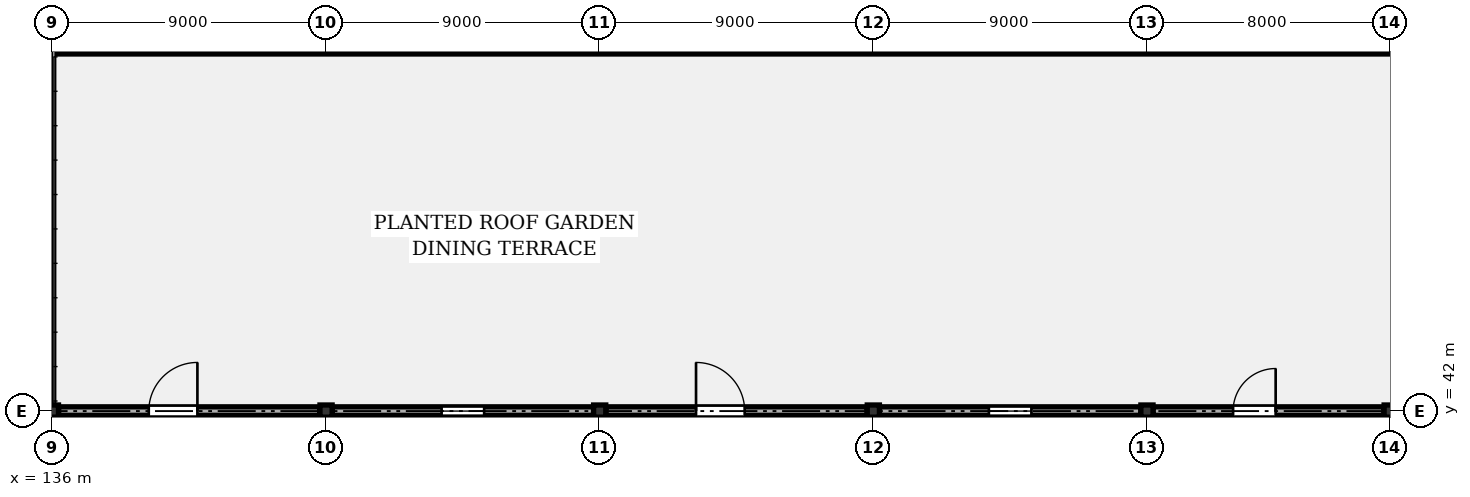
"""IFC4 building model, lengths in metres.
Left out: names, types, materials, properties, quantities, classifications, styles, units other than length and angle.
Written with IfcOpenShell. Run it as: python <this file> out.ifc"""

import sys

from ifc_helpers import new_model, si_unit, direction, frame, frame_2d, origin, origin_2d, place, context, subcontext, project, spatial, rectangle, i_section, extrude, element, fill, save


model = new_model("IFC4")
c1 = context("Model", 3, precision=1e-05, world=origin(), true_north=direction((0.0, 1.0)))
c2 = subcontext(c1, "Body", "Model", "MODEL_VIEW")
j1 = project(units=[si_unit("LENGTHUNIT", "METRE"), si_unit("PLANEANGLEUNIT", "RADIAN")], contexts=[c1])
p1 = place(None, origin())
s1 = spatial("IfcSite", under=j1, at=p1, CompositionType="ELEMENT")
p2 = place(p1, origin())
s2 = spatial("IfcBuilding", under=s1, at=p2, CompositionType="ELEMENT")
p3 = place(p2, frame((0.0, 0.0, 10.8)))
s3 = spatial("IfcBuildingStorey", under=s2, at=p3, CompositionType="ELEMENT", Elevation=10.8)
for number, where, z_axis, x_axis in (
    (1, (136.0, 42.0, 0.0), (0.0, 0.0, 1.0), (1.0, 0.0, 0.0)),
    (2, (145.0, 42.0, 0.0), (0.0, 0.0, 1.0), (1.0, 0.0, 0.0)),
    (3, (154.0, 42.0, 0.0), (0.0, 0.0, 1.0), (1.0, 0.0, 0.0)),
    (4, (163.0, 42.0, 0.0), (0.0, 0.0, 1.0), (1.0, 0.0, 0.0)),
    (5, (172.0, 42.0, 0.0), (0.0, 0.0, 1.0), (1.0, 0.0, 0.0)),
    (6, (180.0, 42.0, 0.0), (0.0, 0.0, 1.0), (1.0, 0.0, 0.0)),
):
    element("IfcColumn", number, at=place(p3, frame(where, z_axis=z_axis, x_axis=x_axis)), inside=s3, PredefinedType="COLUMN", context=c2, shape_type="SweptSolid", body=[
        extrude(i_section(OverallWidth=0.4, OverallDepth=0.4, WebThickness=0.013, FlangeThickness=0.021, FilletRadius=0.022, at=origin_2d()), origin(), (0.0, 0.0, 1.0), 3.6),
    ])
p4 = place(p3, frame((136.2, 42.0, 0.0), z_axis=(0.0, 0.0, 1.0), x_axis=(1.0, 0.0, 0.0)))
e7 = element("IfcWall", 7, at=p4, inside=s3, PredefinedType="SOLIDWALL", context=c2, shape_type="SweptSolid", body=[
    extrude(rectangle(XDim=8.6, YDim=0.28, at=frame_2d((4.3, 0.0))), origin(), (0.0, 0.0, 1.0), 2.795),
])
p5 = place(p4, frame((2.969, 0.0, 0.0)))
e8 = element("IfcOpeningElement", 8, at=p5, cuts=e7, PredefinedType="OPENING", context=c2, shape_type="SweptSolid", body=[
    extrude(rectangle(XDim=1.6, YDim=2.3, at=frame_2d((0.8, 1.15))), frame((0.0, 0.15, 0.0), z_axis=(0.0, -1.0, 0.0), x_axis=(1.0, 0.0, 0.0)), (0.0, 0.0, 1.0), 0.3),
])
p6 = place(p3, frame((145.2, 42.0, 0.0), z_axis=(0.0, 0.0, 1.0), x_axis=(1.0, 0.0, 0.0)))
e9 = element("IfcWall", 9, at=p6, inside=s3, PredefinedType="SOLIDWALL", context=c2, shape_type="SweptSolid", body=[
    extrude(rectangle(XDim=8.6, YDim=0.28, at=frame_2d((4.3, 0.0))), origin(), (0.0, 0.0, 1.0), 2.795),
])
p7 = place(p6, frame((3.6, 0.0, 0.75)))
e10 = element("IfcOpeningElement", 10, at=p7, cuts=e9, PredefinedType="OPENING", context=c2, shape_type="SweptSolid", body=[
    extrude(rectangle(XDim=1.4, YDim=1.55, at=frame_2d((0.7, 0.775))), frame((0.0, 0.15, 0.0), z_axis=(0.0, -1.0, 0.0), x_axis=(1.0, 0.0, 0.0)), (0.0, 0.0, 1.0), 0.3),
])
p8 = place(p3, frame((154.2, 42.0, 0.0), z_axis=(0.0, 0.0, 1.0), x_axis=(1.0, 0.0, 0.0)))
e11 = element("IfcWall", 11, at=p8, inside=s3, PredefinedType="SOLIDWALL", context=c2, shape_type="SweptSolid", body=[
    extrude(rectangle(XDim=8.6, YDim=0.28, at=frame_2d((4.3, 0.0))), origin(), (0.0, 0.0, 1.0), 2.795),
])
p9 = place(p8, frame((2.969, 0.0, 0.0)))
e12 = element("IfcOpeningElement", 12, at=p9, cuts=e11, PredefinedType="OPENING", context=c2, shape_type="SweptSolid", body=[
    extrude(rectangle(XDim=1.6, YDim=2.3, at=frame_2d((0.8, 1.15))), frame((0.0, 0.15, 0.0), z_axis=(0.0, -1.0, 0.0), x_axis=(1.0, 0.0, 0.0)), (0.0, 0.0, 1.0), 0.3),
])
p10 = place(p3, frame((163.2, 42.0, 0.0), z_axis=(0.0, 0.0, 1.0), x_axis=(1.0, 0.0, 0.0)))
e13 = element("IfcWall", 13, at=p10, inside=s3, PredefinedType="SOLIDWALL", context=c2, shape_type="SweptSolid", body=[
    extrude(rectangle(XDim=8.6, YDim=0.28, at=frame_2d((4.3, 0.0))), origin(), (0.0, 0.0, 1.0), 2.795),
])
p11 = place(p10, frame((3.6, 0.0, 0.75)))
e14 = element("IfcOpeningElement", 14, at=p11, cuts=e13, PredefinedType="OPENING", context=c2, shape_type="SweptSolid", body=[
    extrude(rectangle(XDim=1.4, YDim=1.55, at=frame_2d((0.7, 0.775))), frame((0.0, 0.15, 0.0), z_axis=(0.0, -1.0, 0.0), x_axis=(1.0, 0.0, 0.0)), (0.0, 0.0, 1.0), 0.3),
])
p12 = place(p3, frame((172.2, 42.0, 0.0), z_axis=(0.0, 0.0, 1.0), x_axis=(1.0, 0.0, 0.0)))
e15 = element("IfcWall", 15, at=p12, inside=s3, PredefinedType="SOLIDWALL", context=c2, shape_type="SweptSolid", body=[
    extrude(rectangle(XDim=7.6, YDim=0.28, at=frame_2d((3.8, 0.0))), origin(), (0.0, 0.0, 1.0), 2.795),
])
p13 = place(p12, frame((2.633, 0.0, 0.0)))
e16 = element("IfcOpeningElement", 16, at=p13, cuts=e15, PredefinedType="OPENING", context=c2, shape_type="SweptSolid", body=[
    extrude(rectangle(XDim=1.4, YDim=2.25, at=frame_2d((0.7, 1.125))), frame((0.0, 0.15, 0.0), z_axis=(0.0, -1.0, 0.0), x_axis=(1.0, 0.0, 0.0)), (0.0, 0.0, 1.0), 0.3),
])
p14 = place(p3, frame((136.15, 53.85, 0.0), z_axis=(0.0, 0.0, 1.0), x_axis=(1.0, 0.0, 0.0)))
e17 = element("IfcWall", 17, at=p14, inside=s3, PredefinedType="PARAPET", context=c2, shape_type="SweptSolid", body=[
    extrude(rectangle(XDim=51.7, YDim=0.21, at=frame_2d((25.85, 0.0))), origin(), (0.0, 0.0, 1.0), 1.25),
])
p15 = place(p5, origin())
e18 = element("IfcDoor", 18, at=p15, inside=s3, OperationType="SINGLE_SWING_RIGHT", PredefinedType="DOOR", context=c2, shape_type="SweptSolid", body=[
    extrude(rectangle(XDim=1.6, YDim=2.3, at=frame_2d((0.8, 1.15))), frame((0.0, 0.025, 0.0), z_axis=(0.0, -1.0, 0.0), x_axis=(1.0, 0.0, 0.0)), (0.0, 0.0, 1.0), 0.05),
])
fill(e8, e18)
p16 = place(p7, origin())
e19 = element("IfcWindow", 19, at=p16, inside=s3, PartitioningType="SINGLE_PANEL", PredefinedType="WINDOW", context=c2, shape_type="SweptSolid", body=[
    extrude(rectangle(XDim=1.4, YDim=1.55, at=frame_2d((0.7, 0.775))), frame((0.0, 0.03, 0.0), z_axis=(0.0, -1.0, 0.0), x_axis=(1.0, 0.0, 0.0)), (0.0, 0.0, 1.0), 0.06),
])
fill(e10, e19)
p17 = place(p9, origin())
e20 = element("IfcDoor", 20, at=p17, inside=s3, OperationType="SINGLE_SWING_LEFT", PredefinedType="DOOR", context=c2, shape_type="SweptSolid", body=[
    extrude(rectangle(XDim=1.6, YDim=2.3, at=frame_2d((0.8, 1.15))), frame((0.0, 0.025, 0.0), z_axis=(0.0, -1.0, 0.0), x_axis=(1.0, 0.0, 0.0)), (0.0, 0.0, 1.0), 0.05),
])
fill(e12, e20)
p18 = place(p11, origin())
e21 = element("IfcWindow", 21, at=p18, inside=s3, PartitioningType="SINGLE_PANEL", PredefinedType="WINDOW", context=c2, shape_type="SweptSolid", body=[
    extrude(rectangle(XDim=1.4, YDim=1.55, at=frame_2d((0.7, 0.775))), frame((0.0, 0.03, 0.0), z_axis=(0.0, -1.0, 0.0), x_axis=(1.0, 0.0, 0.0)), (0.0, 0.0, 1.0), 0.06),
])
fill(e14, e21)
p19 = place(p13, origin())
e22 = element("IfcDoor", 22, at=p19, inside=s3, OperationType="SINGLE_SWING_RIGHT", PredefinedType="DOOR", context=c2, shape_type="SweptSolid", body=[
    extrude(rectangle(XDim=1.4, YDim=2.25, at=frame_2d((0.7, 1.125))), frame((0.0, 0.025, 0.0), z_axis=(0.0, -1.0, 0.0), x_axis=(1.0, 0.0, 0.0)), (0.0, 0.0, 1.0), 0.05),
])
fill(e16, e22)
save(model, sys.argv[1])
